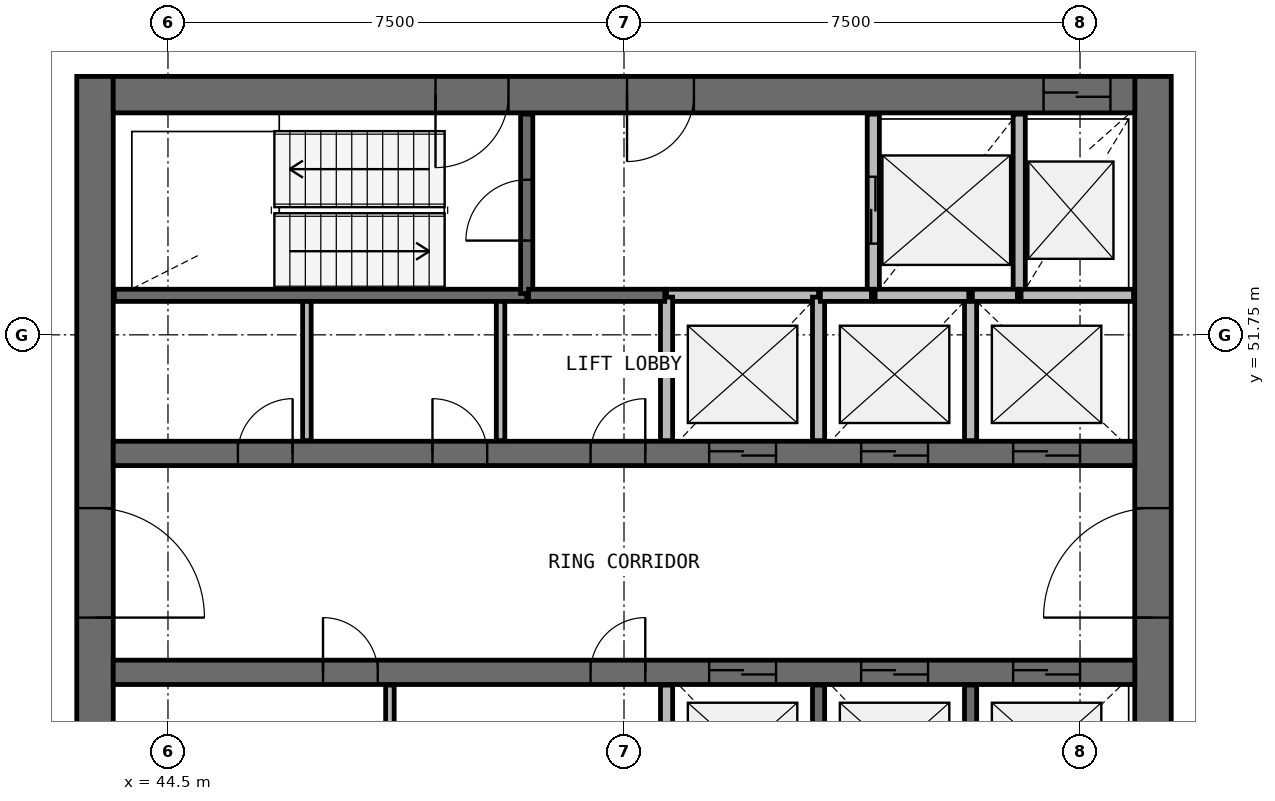
"""IFC4 building model, lengths in metres.
Left out: names, types, materials, properties, quantities, classifications, styles, units other than length and angle.
Written with IfcOpenShell. Run it as: python <this file> out.ifc"""

import sys

from ifc_helpers import new_model, si_unit, direction, frame, frame_2d, origin, place, context, subcontext, project, spatial, rectangle, extrude, source, transform, mapped, element, fill, save


model = new_model("IFC4")
c1 = context("Model", 3, precision=1e-05, world=origin(), true_north=direction((0.0, 1.0)))
c2 = subcontext(c1, "Body", "Model", "MODEL_VIEW")
j1 = project(units=[si_unit("LENGTHUNIT", "METRE"), si_unit("PLANEANGLEUNIT", "RADIAN")], contexts=[c1])
p1 = place(None, origin())
s1 = spatial("IfcSite", under=j1, at=p1, CompositionType="ELEMENT")
p2 = place(p1, origin())
s2 = spatial("IfcBuilding", under=s1, at=p2, CompositionType="ELEMENT")
p3 = place(p2, frame((0.0, 0.0, 191.6)))
s3 = spatial("IfcBuildingStorey", under=s2, at=p3, CompositionType="ELEMENT", Elevation=191.6)
p4 = place(p3, frame((60.7, 40.0, 0.0), z_axis=(0.0, 0.0, 1.0), x_axis=(0.0, 1.0, 0.0)))
e1 = element("IfcWall", 1, at=p4, inside=s3, PredefinedType="SHEAR", context=c2, shape_type="SweptSolid", body=[
    extrude(rectangle(XDim=16.0, YDim=0.6, at=frame_2d((8.0, 0.0))), origin(), (0.0, 0.0, 1.0), 3.9),
])
p5 = place(p4, frame((7.1, 0.0, 0.0)))
e2 = element("IfcOpeningElement", 2, at=p5, cuts=e1, PredefinedType="OPENING", context=c2, shape_type="SweptSolid", body=[
    extrude(rectangle(XDim=1.8, YDim=2.1, at=frame_2d((0.9, 1.05))), frame((0.0, 0.31, 0.0), z_axis=(0.0, -1.0, 0.0), x_axis=(1.0, 0.0, 0.0)), (0.0, 0.0, 1.0), 0.62),
])
p6 = place(p3, frame((43.3, 56.0, 0.0), z_axis=(0.0, 0.0, 1.0), x_axis=(0.0, -1.0, 0.0)))
e3 = element("IfcWall", 3, at=p6, inside=s3, PredefinedType="SHEAR", context=c2, shape_type="SweptSolid", body=[
    extrude(rectangle(XDim=16.0, YDim=0.6, at=frame_2d((8.0, 0.0))), origin(), (0.0, 0.0, 1.0), 3.9),
])
p7 = place(p6, frame((7.1, 0.0, 0.0)))
e4 = element("IfcOpeningElement", 4, at=p7, cuts=e3, PredefinedType="OPENING", context=c2, shape_type="SweptSolid", body=[
    extrude(rectangle(XDim=1.8, YDim=2.1, at=frame_2d((0.9, 1.05))), frame((0.0, 0.31, 0.0), z_axis=(0.0, -1.0, 0.0), x_axis=(1.0, 0.0, 0.0)), (0.0, 0.0, 1.0), 0.62),
])
p8 = place(p3, frame((60.4, 55.7, 0.0), z_axis=(0.0, 0.0, 1.0), x_axis=(-1.0, 0.0, 0.0)))
e5 = element("IfcWall", 5, at=p8, inside=s3, PredefinedType="SHEAR", context=c2, shape_type="SweptSolid", body=[
    extrude(rectangle(XDim=16.8, YDim=0.6, at=frame_2d((8.4, 0.0))), origin(), (0.0, 0.0, 1.0), 3.9),
])
p9 = place(p8, frame((0.4, 0.0, 0.0)))
e6 = element("IfcOpeningElement", 6, at=p9, cuts=e5, PredefinedType="OPENING", context=c2, shape_type="SweptSolid", body=[
    extrude(rectangle(XDim=1.1, YDim=2.1, at=frame_2d((0.55, 1.05))), frame((0.0, 0.31, 0.0), z_axis=(0.0, -1.0, 0.0), x_axis=(1.0, 0.0, 0.0)), (0.0, 0.0, 1.0), 0.62),
])
p10 = place(p8, frame((10.3, 0.0, 0.0)))
e7 = element("IfcOpeningElement", 7, at=p10, cuts=e5, PredefinedType="OPENING", context=c2, shape_type="SweptSolid", body=[
    extrude(rectangle(XDim=1.2, YDim=2.1, at=frame_2d((0.6, 1.05))), frame((0.0, 0.31, 0.0), z_axis=(0.0, -1.0, 0.0), x_axis=(1.0, 0.0, 0.0)), (0.0, 0.0, 1.0), 0.62),
])
p11 = place(p8, frame((7.25, 0.0, 0.0)))
e8 = element("IfcOpeningElement", 8, at=p11, cuts=e5, PredefinedType="OPENING", context=c2, shape_type="SweptSolid", body=[
    extrude(rectangle(XDim=1.1, YDim=2.1, at=frame_2d((0.55, 1.05))), frame((0.0, 0.31, 0.0), z_axis=(0.0, -1.0, 0.0), x_axis=(1.0, 0.0, 0.0)), (0.0, 0.0, 1.0), 0.62),
])
p12 = place(p3, frame((43.6, 49.8, 0.0), z_axis=(0.0, 0.0, 1.0), x_axis=(1.0, 0.0, 0.0)))
e9 = element("IfcWall", 9, at=p12, inside=s3, PredefinedType="SHEAR", context=c2, shape_type="SweptSolid", body=[
    extrude(rectangle(XDim=16.8, YDim=0.4, at=frame_2d((8.4, 0.0))), origin(), (0.0, 0.0, 1.0), 3.9),
])
p13 = place(p12, frame((9.8, 0.0, 0.0)))
e10 = element("IfcOpeningElement", 10, at=p13, cuts=e9, PredefinedType="OPENING", context=c2, shape_type="SweptSolid", body=[
    extrude(rectangle(XDim=1.1, YDim=2.1, at=frame_2d((0.55, 1.05))), frame((0.0, 0.21, 0.0), z_axis=(0.0, -1.0, 0.0), x_axis=(1.0, 0.0, 0.0)), (0.0, 0.0, 1.0), 0.42),
])
p14 = place(p12, frame((12.3, 0.0, 0.0)))
e11 = element("IfcOpeningElement", 11, at=p14, cuts=e9, PredefinedType="OPENING", context=c2, shape_type="SweptSolid", body=[
    extrude(rectangle(XDim=1.1, YDim=2.1, at=frame_2d((0.55, 1.05))), frame((0.0, 0.21, 0.0), z_axis=(0.0, -1.0, 0.0), x_axis=(1.0, 0.0, 0.0)), (0.0, 0.0, 1.0), 0.42),
])
p15 = place(p12, frame((14.8, 0.0, 0.0)))
e12 = element("IfcOpeningElement", 12, at=p15, cuts=e9, PredefinedType="OPENING", context=c2, shape_type="SweptSolid", body=[
    extrude(rectangle(XDim=1.1, YDim=2.1, at=frame_2d((0.55, 1.05))), frame((0.0, 0.21, 0.0), z_axis=(0.0, -1.0, 0.0), x_axis=(1.0, 0.0, 0.0)), (0.0, 0.0, 1.0), 0.42),
])
p16 = place(p12, frame((2.05, 0.0, 0.0)))
e13 = element("IfcOpeningElement", 13, at=p16, cuts=e9, PredefinedType="OPENING", context=c2, shape_type="SweptSolid", body=[
    extrude(rectangle(XDim=0.9, YDim=2.1, at=frame_2d((0.45, 1.05))), frame((0.0, 0.21, 0.0), z_axis=(0.0, -1.0, 0.0), x_axis=(1.0, 0.0, 0.0)), (0.0, 0.0, 1.0), 0.42),
])
p17 = place(p12, frame((5.25, 0.0, 0.0)))
e14 = element("IfcOpeningElement", 14, at=p17, cuts=e9, PredefinedType="OPENING", context=c2, shape_type="SweptSolid", body=[
    extrude(rectangle(XDim=0.9, YDim=2.1, at=frame_2d((0.45, 1.05))), frame((0.0, 0.21, 0.0), z_axis=(0.0, -1.0, 0.0), x_axis=(1.0, 0.0, 0.0)), (0.0, 0.0, 1.0), 0.42),
])
p18 = place(p12, frame((7.85, 0.0, 0.0)))
e15 = element("IfcOpeningElement", 15, at=p18, cuts=e9, PredefinedType="OPENING", context=c2, shape_type="SweptSolid", body=[
    extrude(rectangle(XDim=0.9, YDim=2.1, at=frame_2d((0.45, 1.05))), frame((0.0, 0.21, 0.0), z_axis=(0.0, -1.0, 0.0), x_axis=(1.0, 0.0, 0.0)), (0.0, 0.0, 1.0), 0.42),
])
p19 = place(p3, frame((43.6, 46.2, 0.0), z_axis=(0.0, 0.0, 1.0), x_axis=(1.0, 0.0, 0.0)))
e16 = element("IfcWall", 16, at=p19, inside=s3, PredefinedType="SHEAR", context=c2, shape_type="SweptSolid", body=[
    extrude(rectangle(XDim=16.8, YDim=0.4, at=frame_2d((8.4, 0.0))), origin(), (0.0, 0.0, 1.0), 3.9),
])
p20 = place(p19, frame((9.8, 0.0, 0.0)))
e17 = element("IfcOpeningElement", 17, at=p20, cuts=e16, PredefinedType="OPENING", context=c2, shape_type="SweptSolid", body=[
    extrude(rectangle(XDim=1.1, YDim=2.1, at=frame_2d((0.55, 1.05))), frame((0.0, 0.21, 0.0), z_axis=(0.0, -1.0, 0.0), x_axis=(1.0, 0.0, 0.0)), (0.0, 0.0, 1.0), 0.42),
])
p21 = place(p19, frame((12.3, 0.0, 0.0)))
e18 = element("IfcOpeningElement", 18, at=p21, cuts=e16, PredefinedType="OPENING", context=c2, shape_type="SweptSolid", body=[
    extrude(rectangle(XDim=1.1, YDim=2.1, at=frame_2d((0.55, 1.05))), frame((0.0, 0.21, 0.0), z_axis=(0.0, -1.0, 0.0), x_axis=(1.0, 0.0, 0.0)), (0.0, 0.0, 1.0), 0.42),
])
p22 = place(p19, frame((14.8, 0.0, 0.0)))
e19 = element("IfcOpeningElement", 19, at=p22, cuts=e16, PredefinedType="OPENING", context=c2, shape_type="SweptSolid", body=[
    extrude(rectangle(XDim=1.1, YDim=2.1, at=frame_2d((0.55, 1.05))), frame((0.0, 0.21, 0.0), z_axis=(0.0, -1.0, 0.0), x_axis=(1.0, 0.0, 0.0)), (0.0, 0.0, 1.0), 0.42),
])
p23 = place(p19, frame((3.45, 0.0, 0.0)))
e20 = element("IfcOpeningElement", 20, at=p23, cuts=e16, PredefinedType="OPENING", context=c2, shape_type="SweptSolid", body=[
    extrude(rectangle(XDim=0.9, YDim=2.1, at=frame_2d((0.45, 1.05))), frame((0.0, 0.21, 0.0), z_axis=(0.0, -1.0, 0.0), x_axis=(1.0, 0.0, 0.0)), (0.0, 0.0, 1.0), 0.42),
])
p24 = place(p19, frame((7.85, 0.0, 0.0)))
e21 = element("IfcOpeningElement", 21, at=p24, cuts=e16, PredefinedType="OPENING", context=c2, shape_type="SweptSolid", body=[
    extrude(rectangle(XDim=0.9, YDim=2.1, at=frame_2d((0.45, 1.05))), frame((0.0, 0.21, 0.0), z_axis=(0.0, -1.0, 0.0), x_axis=(1.0, 0.0, 0.0)), (0.0, 0.0, 1.0), 0.42),
])
p25 = place(p3, frame((43.62, 52.4, 0.0), z_axis=(0.0, 0.0, 1.0), x_axis=(1.0, 0.0, 0.0)))
e22 = element("IfcWall", 22, at=p25, inside=s3, PredefinedType="SOLIDWALL", context=c2, shape_type="SweptSolid", body=[
    extrude(rectangle(XDim=6.78, YDim=0.2, at=frame_2d((3.39, 0.0))), origin(), (0.0, 0.0, 1.0), 3.58),
])
p26 = place(p3, frame((50.4, 52.43, 0.0), z_axis=(0.0, 0.0, 1.0), x_axis=(0.0, 1.0, 0.0)))
e23 = element("IfcWall", 23, at=p26, inside=s3, PredefinedType="SOLIDWALL", context=c2, shape_type="SweptSolid", body=[
    extrude(rectangle(XDim=2.95, YDim=0.2, at=frame_2d((1.475, 0.0))), origin(), (0.0, 0.0, 1.0), 3.58),
])
p27 = place(p26, frame((0.87, 0.0, 0.0)))
e24 = element("IfcOpeningElement", 24, at=p27, cuts=e23, PredefinedType="OPENING", context=c2, shape_type="SweptSolid", body=[
    extrude(rectangle(XDim=1.0, YDim=2.1, at=frame_2d((0.5, 1.05))), frame((0.0, 0.11, 0.0), z_axis=(0.0, -1.0, 0.0), x_axis=(1.0, 0.0, 0.0)), (0.0, 0.0, 1.0), 0.22),
])
p28 = place(p3, frame((56.1, 55.38, 0.0), z_axis=(0.0, 0.0, 1.0), x_axis=(0.0, -1.0, 0.0)))
e25 = element("IfcWall", 25, at=p28, inside=s3, PredefinedType="SOLIDWALL", context=c2, shape_type="SweptSolid", body=[
    extrude(rectangle(XDim=2.98, YDim=0.2, at=frame_2d((1.49, 0.0))), origin(), (0.0, 0.0, 1.0), 3.58),
])
p29 = place(p28, frame((1.03, 0.0, 0.0)))
e26 = element("IfcOpeningElement", 26, at=p29, cuts=e25, PredefinedType="OPENING", context=c2, shape_type="SweptSolid", body=[
    extrude(rectangle(XDim=1.1, YDim=2.1, at=frame_2d((0.55, 1.05))), frame((0.0, 0.11, 0.0), z_axis=(0.0, -1.0, 0.0), x_axis=(1.0, 0.0, 0.0)), (0.0, 0.0, 1.0), 0.22),
])
p30 = place(p3, frame((58.5, 52.4, 0.0), z_axis=(0.0, 0.0, 1.0), x_axis=(0.0, 1.0, 0.0)))
e27 = element("IfcWall", 27, at=p30, inside=s3, PredefinedType="SOLIDWALL", context=c2, shape_type="SweptSolid", body=[
    extrude(rectangle(XDim=2.98, YDim=0.2, at=frame_2d((1.49, 0.0))), origin(), (0.0, 0.0, 1.0), 3.58),
])
p31 = place(p3, frame((55.2, 52.4, 0.0), z_axis=(0.0, 0.0, 1.0), x_axis=(-1.0, 0.0, 0.0)))
e28 = element("IfcWall", 28, at=p31, inside=s3, PredefinedType="SOLIDWALL", context=c2, shape_type="SweptSolid", body=[
    extrude(rectangle(XDim=2.5, YDim=0.2, at=frame_2d((1.25, 0.0))), origin(), (0.0, 0.0, 1.0), 3.58),
])
for number, where, z_axis, x_axis in (
    (29, (52.7, 45.99, 0.0), (0.0, 0.0, 1.0), (0.0, -1.0, 0.0)),
    (30, (52.7, 52.37, 0.0), (0.0, 0.0, 1.0), (0.0, -1.0, 0.0)),
    (31, (55.2, 43.63, 0.0), (0.0, 0.0, 1.0), (0.0, 1.0, 0.0)),
    (32, (55.2, 50.01, 0.0), (0.0, 0.0, 1.0), (0.0, 1.0, 0.0)),
    (33, (57.7, 43.63, 0.0), (0.0, 0.0, 1.0), (0.0, 1.0, 0.0)),
):
    element("IfcWall", number, at=place(p3, frame(where, z_axis=z_axis, x_axis=x_axis)), inside=s3, PredefinedType="SOLIDWALL", context=c2, shape_type="SweptSolid", body=[
        extrude(rectangle(XDim=2.36, YDim=0.2, at=frame_2d((1.18, 0.0))), origin(), (0.0, 0.0, 1.0), 3.58),
    ])
p32 = place(p3, frame((57.7, 50.01, 0.0), z_axis=(0.0, 0.0, 1.0), x_axis=(0.0, 1.0, 0.0)))
e34 = element("IfcWall", 34, at=p32, inside=s3, PredefinedType="SOLIDWALL", context=c2, shape_type="SweptSolid", body=[
    extrude(rectangle(XDim=2.39, YDim=0.2, at=frame_2d((1.195, 0.0))), origin(), (0.0, 0.0, 1.0), 3.58),
])
p33 = place(p3, frame((50.43, 52.4, 0.0), z_axis=(0.0, 0.0, 1.0), x_axis=(1.0, 0.0, 0.0)))
e35 = element("IfcWall", 35, at=p33, inside=s3, PredefinedType="SOLIDWALL", context=c2, shape_type="SweptSolid", body=[
    extrude(rectangle(XDim=2.24, YDim=0.2, at=frame_2d((1.12, 0.0))), origin(), (0.0, 0.0, 1.0), 3.58),
])
p34 = place(p3, frame((60.38, 52.4, 0.0), z_axis=(0.0, 0.0, 1.0), x_axis=(-1.0, 0.0, 0.0)))
e36 = element("IfcWall", 36, at=p34, inside=s3, PredefinedType="SOLIDWALL", context=c2, shape_type="SweptSolid", body=[
    extrude(rectangle(XDim=1.85, YDim=0.2, at=frame_2d((0.925, 0.0))), origin(), (0.0, 0.0, 1.0), 3.58),
])
p35 = place(p3, frame((57.67, 52.4, 0.0), z_axis=(0.0, 0.0, 1.0), x_axis=(-1.0, 0.0, 0.0)))
e37 = element("IfcWall", 37, at=p35, inside=s3, PredefinedType="SOLIDWALL", context=c2, shape_type="SweptSolid", body=[
    extrude(rectangle(XDim=1.54, YDim=0.2, at=frame_2d((0.77, 0.0))), origin(), (0.0, 0.0, 1.0), 3.58),
])
p36 = place(p3, frame((56.07, 52.4, 0.0), z_axis=(0.0, 0.0, 1.0), x_axis=(-1.0, 0.0, 0.0)))
e38 = element("IfcWall", 38, at=p36, inside=s3, PredefinedType="SOLIDWALL", context=c2, shape_type="SweptSolid", body=[
    extrude(rectangle(XDim=0.84, YDim=0.2, at=frame_2d((0.42, 0.0))), origin(), (0.0, 0.0, 1.0), 3.58),
])
p37 = place(p3, frame((58.47, 52.4, 0.0), z_axis=(0.0, 0.0, 1.0), x_axis=(-1.0, 0.0, 0.0)))
e39 = element("IfcWall", 39, at=p37, inside=s3, PredefinedType="SOLIDWALL", context=c2, shape_type="SweptSolid", body=[
    extrude(rectangle(XDim=0.74, YDim=0.2, at=frame_2d((0.37, 0.0))), origin(), (0.0, 0.0, 1.0), 3.58),
])
for number, where, z_axis, x_axis in (
    (40, (46.785, 50.01, 0.0), (0.0, 0.0, 1.0), (0.0, 1.0, 0.0)),
    (41, (48.15, 43.7, 0.0), (0.0, 0.0, 1.0), (0.0, 1.0, 0.0)),
    (42, (49.97, 50.01, 0.0), (0.0, 0.0, 1.0), (0.0, 1.0, 0.0)),
):
    element("IfcWall", number, at=place(p3, frame(where, z_axis=z_axis, x_axis=x_axis)), inside=s3, PredefinedType="PARTITIONING", context=c2, shape_type="SweptSolid", body=[
        extrude(rectangle(XDim=2.29, YDim=0.14, at=frame_2d((1.145, 0.0))), origin(), (0.0, 0.0, 1.0), 2.88),
    ])
m1 = source(origin(), c2, "Body", "SweptSolid", [
    extrude(rectangle(XDim=1.8, YDim=2.1, at=frame_2d((0.9, 1.05))), frame((0.0, 0.025, 0.0), z_axis=(0.0, -1.0, 0.0), x_axis=(1.0, 0.0, 0.0)), (0.0, 0.0, 1.0), 0.05),
])
p38 = place(p7, origin())
e43 = element("IfcDoor", 43, at=p38, inside=s3, OperationType="SINGLE_SWING_RIGHT", PredefinedType="DOOR", context=c2, shape_type="MappedRepresentation", body=[
    mapped(m1, transform((0.0, 0.0, 0.0), scale=1.0)),
])
fill(e4, e43)
p39 = place(p5, origin())
e44 = element("IfcDoor", 44, at=p39, inside=s3, OperationType="SINGLE_SWING_LEFT", PredefinedType="DOOR", context=c2, shape_type="MappedRepresentation", body=[
    mapped(m1, transform((0.0, 0.0, 0.0), scale=1.0)),
])
fill(e2, e44)
m2 = source(origin(), c2, "Body", "SweptSolid", [
    extrude(rectangle(XDim=1.1, YDim=2.1, at=frame_2d((0.55, 1.05))), frame((0.0, 0.025, 0.0), z_axis=(0.0, -1.0, 0.0), x_axis=(1.0, 0.0, 0.0)), (0.0, 0.0, 1.0), 0.05),
])
p40 = place(p13, origin())
e45 = element("IfcDoor", 45, at=p40, inside=s3, OperationType="DOUBLE_DOOR_SLIDING", PredefinedType="USERDEFINED", context=c2, shape_type="MappedRepresentation", body=[
    mapped(m2, transform((0.0, 0.0, 0.0), scale=1.0)),
])
fill(e10, e45)
p41 = place(p14, origin())
e46 = element("IfcDoor", 46, at=p41, inside=s3, OperationType="DOUBLE_DOOR_SLIDING", PredefinedType="USERDEFINED", context=c2, shape_type="MappedRepresentation", body=[
    mapped(m2, transform((0.0, 0.0, 0.0), scale=1.0)),
])
fill(e11, e46)
p42 = place(p15, origin())
e47 = element("IfcDoor", 47, at=p42, inside=s3, OperationType="DOUBLE_DOOR_SLIDING", PredefinedType="USERDEFINED", context=c2, shape_type="MappedRepresentation", body=[
    mapped(m2, transform((0.0, 0.0, 0.0), scale=1.0)),
])
fill(e12, e47)
p43 = place(p20, origin())
e48 = element("IfcDoor", 48, at=p43, inside=s3, OperationType="DOUBLE_DOOR_SLIDING", PredefinedType="USERDEFINED", context=c2, shape_type="MappedRepresentation", body=[
    mapped(m2, transform((0.0, 0.0, 0.0), scale=1.0)),
])
fill(e17, e48)
p44 = place(p21, origin())
e49 = element("IfcDoor", 49, at=p44, inside=s3, OperationType="DOUBLE_DOOR_SLIDING", PredefinedType="USERDEFINED", context=c2, shape_type="MappedRepresentation", body=[
    mapped(m2, transform((0.0, 0.0, 0.0), scale=1.0)),
])
fill(e18, e49)
p45 = place(p22, origin())
e50 = element("IfcDoor", 50, at=p45, inside=s3, OperationType="DOUBLE_DOOR_SLIDING", PredefinedType="USERDEFINED", context=c2, shape_type="MappedRepresentation", body=[
    mapped(m2, transform((0.0, 0.0, 0.0), scale=1.0)),
])
fill(e19, e50)
p46 = place(p29, origin())
e51 = element("IfcDoor", 51, at=p46, inside=s3, OperationType="DOUBLE_DOOR_SLIDING", PredefinedType="USERDEFINED", context=c2, shape_type="MappedRepresentation", body=[
    mapped(m2, transform((0.0, 0.0, 0.0), scale=1.0)),
])
fill(e26, e51)
p47 = place(p9, origin())
e52 = element("IfcDoor", 52, at=p47, inside=s3, OperationType="DOUBLE_DOOR_SLIDING", PredefinedType="USERDEFINED", context=c2, shape_type="MappedRepresentation", body=[
    mapped(m2, transform((0.0, 0.0, 0.0), scale=1.0)),
])
fill(e6, e52)
m3 = source(origin(), c2, "Body", "SweptSolid", [
    extrude(rectangle(XDim=1.2, YDim=2.1, at=frame_2d((0.6, 1.05))), frame((0.0, 0.025, 0.0), z_axis=(0.0, -1.0, 0.0), x_axis=(1.0, 0.0, 0.0)), (0.0, 0.0, 1.0), 0.05),
])
p48 = place(p10, origin())
e53 = element("IfcDoor", 53, at=p48, inside=s3, OperationType="SINGLE_SWING_RIGHT", PredefinedType="DOOR", context=c2, shape_type="MappedRepresentation", body=[
    mapped(m3, transform((0.0, 0.0, 0.0), scale=1.0)),
])
fill(e7, e53)
m4 = source(origin(), c2, "Body", "SweptSolid", [
    extrude(rectangle(XDim=1.0, YDim=2.1, at=frame_2d((0.5, 1.05))), frame((0.0, 0.025, 0.0), z_axis=(0.0, -1.0, 0.0), x_axis=(1.0, 0.0, 0.0)), (0.0, 0.0, 1.0), 0.05),
])
p49 = place(p27, origin())
e54 = element("IfcDoor", 54, at=p49, inside=s3, OperationType="SINGLE_SWING_LEFT", PredefinedType="DOOR", context=c2, shape_type="MappedRepresentation", body=[
    mapped(m4, transform((0.0, 0.0, 0.0), scale=1.0)),
])
fill(e24, e54)
m5 = source(origin(), c2, "Body", "SweptSolid", [
    extrude(rectangle(XDim=1.1, YDim=2.1, at=frame_2d((0.55, 1.05))), frame((0.0, 0.025, 0.0), z_axis=(0.0, -1.0, 0.0), x_axis=(1.0, 0.0, 0.0)), (0.0, 0.0, 1.0), 0.05),
])
p50 = place(p11, origin())
e55 = element("IfcDoor", 55, at=p50, inside=s3, OperationType="SINGLE_SWING_RIGHT", PredefinedType="DOOR", context=c2, shape_type="MappedRepresentation", body=[
    mapped(m5, transform((0.0, 0.0, 0.0), scale=1.0)),
])
fill(e8, e55)
m6 = source(origin(), c2, "Body", "SweptSolid", [
    extrude(rectangle(XDim=0.9, YDim=2.1, at=frame_2d((0.45, 1.05))), frame((0.0, 0.025, 0.0), z_axis=(0.0, -1.0, 0.0), x_axis=(1.0, 0.0, 0.0)), (0.0, 0.0, 1.0), 0.05),
])
p51 = place(p16, origin())
e56 = element("IfcDoor", 56, at=p51, inside=s3, OperationType="SINGLE_SWING_RIGHT", PredefinedType="DOOR", context=c2, shape_type="MappedRepresentation", body=[
    mapped(m6, transform((0.0, 0.0, 0.0), scale=1.0)),
])
fill(e13, e56)
p52 = place(p17, origin())
e57 = element("IfcDoor", 57, at=p52, inside=s3, OperationType="SINGLE_SWING_LEFT", PredefinedType="DOOR", context=c2, shape_type="MappedRepresentation", body=[
    mapped(m6, transform((0.0, 0.0, 0.0), scale=1.0)),
])
fill(e14, e57)
p53 = place(p18, origin())
e58 = element("IfcDoor", 58, at=p53, inside=s3, OperationType="SINGLE_SWING_RIGHT", PredefinedType="DOOR", context=c2, shape_type="MappedRepresentation", body=[
    mapped(m6, transform((0.0, 0.0, 0.0), scale=1.0)),
])
fill(e15, e58)
p54 = place(p23, origin())
e59 = element("IfcDoor", 59, at=p54, inside=s3, OperationType="SINGLE_SWING_LEFT", PredefinedType="DOOR", context=c2, shape_type="MappedRepresentation", body=[
    mapped(m6, transform((0.0, 0.0, 0.0), scale=1.0)),
])
fill(e20, e59)
p55 = place(p24, origin())
e60 = element("IfcDoor", 60, at=p55, inside=s3, OperationType="SINGLE_SWING_RIGHT", PredefinedType="DOOR", context=c2, shape_type="MappedRepresentation", body=[
    mapped(m6, transform((0.0, 0.0, 0.0), scale=1.0)),
])
fill(e21, e60)
save(model, sys.argv[1])
